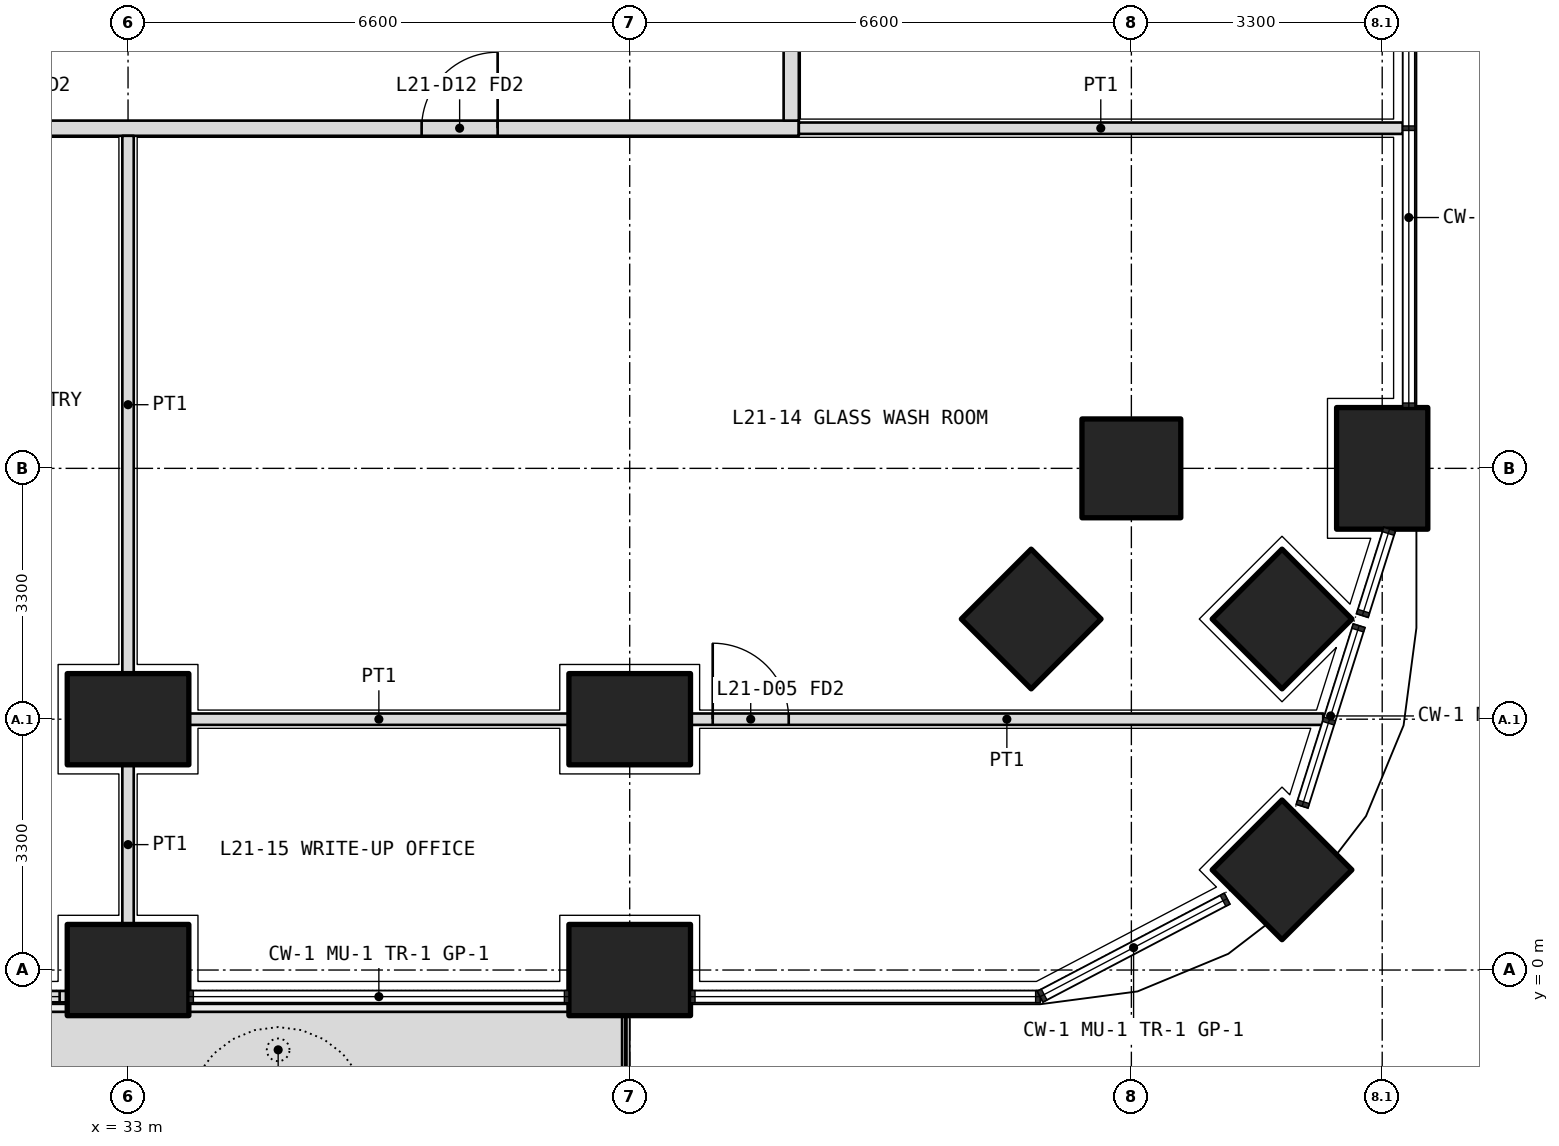
"""IFC4 building model, lengths in metres.
Left out: names, types, materials, properties, quantities, classifications, styles, units other than length and angle.
Written with IfcOpenShell. Run it as: python <this file> out.ifc"""

import sys

from ifc_helpers import new_model, si_unit, direction, frame, frame_2d, origin, origin_2d, place, context, subcontext, project, spatial, polyline, rectangle, outline, extrude, element, fill, save


model = new_model("IFC4")
c1 = context("Model", 3, precision=1e-05, world=origin(), true_north=direction((0.0, 1.0)))
c2 = subcontext(c1, "Body", "Model", "MODEL_VIEW")
j1 = project(units=[si_unit("LENGTHUNIT", "METRE"), si_unit("PLANEANGLEUNIT", "RADIAN")], contexts=[c1])
p1 = place(None, origin())
s1 = spatial("IfcSite", under=j1, at=p1, CompositionType="ELEMENT")
p2 = place(p1, origin())
s2 = spatial("IfcBuilding", under=s1, at=p2, CompositionType="ELEMENT")
p3 = place(p2, frame((0.0, 0.0, 94.8)))
s3 = spatial("IfcBuildingStorey", under=s2, at=p3, CompositionType="ELEMENT", Elevation=94.8)
p4 = place(p3, frame((48.182, 1.318, 0.0), z_axis=(0.0, 0.0, 1.0), x_axis=(0.707106781187, 0.707106781187, 0.0)))
e1 = element("IfcColumn", 1, at=p4, inside=s3, PredefinedType="COLUMN", context=c2, shape_type="SweptSolid", body=[
    extrude(rectangle(XDim=1.3, YDim=1.3, at=origin_2d()), origin(), (0.0, 0.0, 1.0), 4.2),
])
for number, where, z_axis, x_axis in (
    (2, (33.0, 0.0, 0.0), (0.0, 0.0, 1.0), (1.0, 0.0, 0.0)),
    (3, (39.6, 0.0, 0.0), (0.0, 0.0, 1.0), (1.0, 0.0, 0.0)),
    (4, (49.5, 6.6, 0.0), (0.0, 0.0, 1.0), (0.0, 1.0, 0.0)),
):
    element("IfcColumn", number, at=place(p3, frame(where, z_axis=z_axis, x_axis=x_axis)), inside=s3, PredefinedType="COLUMN", context=c2, shape_type="SweptSolid", body=[
        extrude(rectangle(XDim=1.6, YDim=1.2, at=origin_2d()), origin(), (0.0, 0.0, 1.0), 4.2),
    ])
for number, where, z_axis, x_axis in (
    (5, (46.2, 6.6, 0.0), (0.0, 0.0, 1.0), (1.0, 0.0, 0.0)),
    (6, (48.182, 4.618, 0.0), (0.0, 0.0, 1.0), (0.707, 0.707, 0.0)),
):
    element("IfcColumn", number, at=place(p3, frame(where, z_axis=z_axis, x_axis=x_axis)), inside=s3, PredefinedType="COLUMN", context=c2, shape_type="SweptSolid", body=[
        extrude(rectangle(XDim=1.3, YDim=1.3, at=origin_2d()), origin(), (0.0, 0.0, 1.0), 4.2),
    ])
for number, where, z_axis, x_axis in (
    (7, (33.0, 3.3, 0.0), (0.0, 0.0, 1.0), (1.0, 0.0, 0.0)),
    (8, (39.6, 3.3, 0.0), (0.0, 0.0, 1.0), (1.0, 0.0, 0.0)),
):
    element("IfcColumn", number, at=place(p3, frame(where, z_axis=z_axis, x_axis=x_axis)), inside=s3, PredefinedType="COLUMN", context=c2, shape_type="SweptSolid", body=[
        extrude(rectangle(XDim=1.6, YDim=1.2, at=origin_2d()), origin(), (0.0, 0.0, 1.0), 4.2),
    ])
p5 = place(p3, frame((44.882, 4.618, 0.0), z_axis=(0.0, 0.0, 1.0), x_axis=(0.707106781187, 0.707106781187, 0.0)))
e9 = element("IfcColumn", 9, at=p5, inside=s3, PredefinedType="COLUMN", context=c2, shape_type="SweptSolid", body=[
    extrude(rectangle(XDim=1.3, YDim=1.3, at=origin_2d()), origin(), (0.0, 0.0, 1.0), 4.2),
])
p6 = place(p3, origin())
e10 = element("IfcWall", 10, at=p6, inside=s3, PredefinedType="USERDEFINED", context=c2, shape_type="SweptSolid", body=[
    extrude(outline(polyline([(30.45, -1.55), (39.5, -1.55), (39.5, -0.55), (30.45, -0.55), (30.45, -1.55)]), holes=[polyline([(30.6, -1.4), (39.35, -1.4), (39.35, -0.7), (30.6, -0.7), (30.6, -1.4)])]), origin(), (0.0, 0.0, 1.0), 1.05),
])
p7 = place(p3, frame((27.2, -0.35, 0.0), z_axis=(0.0, 0.0, 1.0), x_axis=(1.0, 0.0, 0.0)))
e11 = element("IfcWall", 11, at=p7, inside=s3, PredefinedType="SOLIDWALL", context=c2, shape_type="SweptSolid", body=[
    extrude(rectangle(XDim=5.0, YDim=0.15, at=frame_2d((2.5, 0.0))), origin(), (0.0, 0.0, 1.0), 2.7),
])
p8 = place(p7, frame((2.75, 0.0, 0.0)))
e12 = element("IfcOpeningElement", 12, at=p8, cuts=e11, PredefinedType="OPENING", context=c2, shape_type="SweptSolid", body=[
    extrude(rectangle(XDim=1.0, YDim=2.4, at=frame_2d((0.5, 1.2))), frame((0.0, 0.085, 0.0), z_axis=(0.0, -1.0, 0.0), x_axis=(1.0, 0.0, 0.0)), (0.0, 0.0, 1.0), 0.17),
])
p9 = place(p7, frame((0.1, 0.0, 0.1)))
e13 = element("IfcOpeningElement", 13, at=p9, cuts=e11, PredefinedType="OPENING", context=c2, shape_type="SweptSolid", body=[
    extrude(rectangle(XDim=2.15, YDim=2.3, at=frame_2d((1.075, 1.15))), frame((0.0, 0.085, 0.0), z_axis=(0.0, -1.0, 0.0), x_axis=(1.0, 0.0, 0.0)), (0.0, 0.0, 1.0), 0.17),
])
p10 = place(p7, frame((3.85, 0.0, 0.1)))
e14 = element("IfcOpeningElement", 14, at=p10, cuts=e11, PredefinedType="OPENING", context=c2, shape_type="SweptSolid", body=[
    extrude(rectangle(XDim=1.05, YDim=2.3, at=frame_2d((0.525, 1.15))), frame((0.0, 0.085, 0.0), z_axis=(0.0, -1.0, 0.0), x_axis=(1.0, 0.0, 0.0)), (0.0, 0.0, 1.0), 0.17),
])
p11 = place(p3, frame((10.975, 11.075, 0.0), z_axis=(0.0, 0.0, 1.0), x_axis=(1.0, 0.0, 0.0)))
e15 = element("IfcWall", 15, at=p11, inside=s3, PredefinedType="PARTITIONING", context=c2, shape_type="SweptSolid", body=[
    extrude(rectangle(XDim=30.85, YDim=0.2, at=frame_2d((15.425, 0.0))), origin(), (0.0, 0.0, 1.0), 2.85),
])
p12 = place(p11, frame((0.663, 0.0, 0.0)))
e16 = element("IfcOpeningElement", 16, at=p12, cuts=e15, PredefinedType="OPENING", context=c2, shape_type="SweptSolid", body=[
    extrude(rectangle(XDim=1.0, YDim=2.1, at=frame_2d((0.5, 1.05))), frame((0.0, 0.11, 0.0), z_axis=(0.0, -1.0, 0.0), x_axis=(1.0, 0.0, 0.0)), (0.0, 0.0, 1.0), 0.22),
])
p13 = place(p11, frame((3.275, 0.0, 0.0)))
e17 = element("IfcOpeningElement", 17, at=p13, cuts=e15, PredefinedType="OPENING", context=c2, shape_type="SweptSolid", body=[
    extrude(rectangle(XDim=1.2, YDim=2.1, at=frame_2d((0.6, 1.05))), frame((0.0, 0.11, 0.0), z_axis=(0.0, -1.0, 0.0), x_axis=(1.0, 0.0, 0.0)), (0.0, 0.0, 1.0), 0.22),
])
p14 = place(p11, frame((8.325, 0.0, 0.0)))
e18 = element("IfcOpeningElement", 18, at=p14, cuts=e15, PredefinedType="OPENING", context=c2, shape_type="SweptSolid", body=[
    extrude(rectangle(XDim=1.0, YDim=2.1, at=frame_2d((0.5, 1.05))), frame((0.0, 0.11, 0.0), z_axis=(0.0, -1.0, 0.0), x_axis=(1.0, 0.0, 0.0)), (0.0, 0.0, 1.0), 0.22),
])
p15 = place(p11, frame((13.275, 0.0, 0.0)))
e19 = element("IfcOpeningElement", 19, at=p15, cuts=e15, PredefinedType="OPENING", context=c2, shape_type="SweptSolid", body=[
    extrude(rectangle(XDim=1.0, YDim=2.1, at=frame_2d((0.5, 1.05))), frame((0.0, 0.11, 0.0), z_axis=(0.0, -1.0, 0.0), x_axis=(1.0, 0.0, 0.0)), (0.0, 0.0, 1.0), 0.22),
])
p16 = place(p11, frame((16.625, 0.0, 0.0)))
e20 = element("IfcOpeningElement", 20, at=p16, cuts=e15, PredefinedType="OPENING", context=c2, shape_type="SweptSolid", body=[
    extrude(rectangle(XDim=1.0, YDim=2.1, at=frame_2d((0.5, 1.05))), frame((0.0, 0.11, 0.0), z_axis=(0.0, -1.0, 0.0), x_axis=(1.0, 0.0, 0.0)), (0.0, 0.0, 1.0), 0.22),
])
p17 = place(p11, frame((19.925, 0.0, 0.0)))
e21 = element("IfcOpeningElement", 21, at=p17, cuts=e15, PredefinedType="OPENING", context=c2, shape_type="SweptSolid", body=[
    extrude(rectangle(XDim=1.0, YDim=2.1, at=frame_2d((0.5, 1.05))), frame((0.0, 0.11, 0.0), z_axis=(0.0, -1.0, 0.0), x_axis=(1.0, 0.0, 0.0)), (0.0, 0.0, 1.0), 0.22),
])
p18 = place(p11, frame((25.887, 0.0, 0.0)))
e22 = element("IfcOpeningElement", 22, at=p18, cuts=e15, PredefinedType="OPENING", context=c2, shape_type="SweptSolid", body=[
    extrude(rectangle(XDim=1.0, YDim=2.1, at=frame_2d((0.5, 1.05))), frame((0.0, 0.11, 0.0), z_axis=(0.0, -1.0, 0.0), x_axis=(1.0, 0.0, 0.0)), (0.0, 0.0, 1.0), 0.22),
])
p19 = place(p3, frame((41.725, 11.175, 0.0), z_axis=(0.0, 0.0, 1.0), x_axis=(0.0, 1.0, 0.0)))
e23 = element("IfcWall", 23, at=p19, inside=s3, PredefinedType="PARTITIONING", context=c2, shape_type="SweptSolid", body=[
    extrude(rectangle(XDim=5.325, YDim=0.2, at=frame_2d((2.663, 0.0))), origin(), (0.0, 0.0, 1.0), 2.85),
])
p20 = place(p19, frame((2.113, 0.0, 0.0)))
e24 = element("IfcOpeningElement", 24, at=p20, cuts=e23, PredefinedType="OPENING", context=c2, shape_type="SweptSolid", body=[
    extrude(rectangle(XDim=1.0, YDim=2.1, at=frame_2d((0.5, 1.05))), frame((0.0, 0.11, 0.0), z_axis=(0.0, -1.0, 0.0), x_axis=(1.0, 0.0, 0.0)), (0.0, 0.0, 1.0), 0.22),
])
p21 = place(p3, frame((49.77, 11.075, 0.0), z_axis=(0.0, 0.0, 1.0), x_axis=(-1.0, 0.0, 0.0)))
e25 = element("IfcWall", 25, at=p21, inside=s3, PredefinedType="PARTITIONING", context=c2, shape_type="SweptSolid", body=[
    extrude(rectangle(XDim=7.945, YDim=0.15, at=frame_2d((3.973, 0.0))), origin(), (0.0, 0.0, 1.0), 2.7),
])
p22 = place(p3, frame((33.8, 3.3, 0.0), z_axis=(0.0, 0.0, 1.0), x_axis=(1.0, 0.0, 0.0)))
e26 = element("IfcWall", 26, at=p22, inside=s3, PredefinedType="PARTITIONING", context=c2, shape_type="SweptSolid", body=[
    extrude(rectangle(XDim=5.0, YDim=0.15, at=frame_2d((2.5, 0.0))), origin(), (0.0, 0.0, 1.0), 3.9),
])
p23 = place(p3, frame((40.4, 3.3, 0.0), z_axis=(0.0, 0.0, 1.0), x_axis=(1.0, 0.0, 0.0)))
e27 = element("IfcWall", 27, at=p23, inside=s3, PredefinedType="PARTITIONING", context=c2, shape_type="SweptSolid", body=[
    extrude(rectangle(XDim=8.324, YDim=0.15, at=frame_2d((4.162, 0.0))), origin(), (0.0, 0.0, 1.0), 2.7),
])
p24 = place(p23, frame((0.292, 0.0, 0.0)))
e28 = element("IfcOpeningElement", 28, at=p24, cuts=e27, PredefinedType="OPENING", context=c2, shape_type="SweptSolid", body=[
    extrude(rectangle(XDim=1.0, YDim=2.1, at=frame_2d((0.5, 1.05))), frame((0.0, 0.085, 0.0), z_axis=(0.0, -1.0, 0.0), x_axis=(1.0, 0.0, 0.0)), (0.0, 0.0, 1.0), 0.17),
])
p25 = place(p3, frame((33.0, 0.6, 0.0), z_axis=(0.0, 0.0, 1.0), x_axis=(0.0, 1.0, 0.0)))
e29 = element("IfcWall", 29, at=p25, inside=s3, PredefinedType="PARTITIONING", context=c2, shape_type="SweptSolid", body=[
    extrude(rectangle(XDim=2.1, YDim=0.15, at=frame_2d((1.05, 0.0))), origin(), (0.0, 0.0, 1.0), 2.85),
])
p26 = place(p3, frame((33.0, 3.9, 0.0), z_axis=(0.0, 0.0, 1.0), x_axis=(0.0, 1.0, 0.0)))
e30 = element("IfcWall", 30, at=p26, inside=s3, PredefinedType="PARTITIONING", context=c2, shape_type="SweptSolid", body=[
    extrude(rectangle(XDim=7.075, YDim=0.15, at=frame_2d((3.538, 0.0))), origin(), (0.0, 0.0, 1.0), 2.85),
])
p27 = place(p10, origin())
e31 = element("IfcWindow", 31, at=p27, inside=s3, PartitioningType="SINGLE_PANEL", PredefinedType="WINDOW", context=c2, shape_type="SweptSolid", body=[
    extrude(rectangle(XDim=1.05, YDim=2.3, at=frame_2d((0.525, 1.15))), frame((0.0, 0.03, 0.0), z_axis=(0.0, -1.0, 0.0), x_axis=(1.0, 0.0, 0.0)), (0.0, 0.0, 1.0), 0.06),
])
fill(e14, e31)
p28 = place(p18, origin())
e32 = element("IfcDoor", 32, at=p28, inside=s3, OperationType="SINGLE_SWING_RIGHT", PredefinedType="DOOR", context=c2, shape_type="SweptSolid", body=[
    extrude(rectangle(XDim=1.0, YDim=2.1, at=frame_2d((0.5, 1.05))), frame((0.0, 0.025, 0.0), z_axis=(0.0, -1.0, 0.0), x_axis=(1.0, 0.0, 0.0)), (0.0, 0.0, 1.0), 0.05),
])
fill(e22, e32)
p29 = place(p24, origin())
e33 = element("IfcDoor", 33, at=p29, inside=s3, OperationType="SINGLE_SWING_LEFT", PredefinedType="DOOR", context=c2, shape_type="SweptSolid", body=[
    extrude(rectangle(XDim=1.0, YDim=2.1, at=frame_2d((0.5, 1.05))), frame((0.0, 0.025, 0.0), z_axis=(0.0, -1.0, 0.0), x_axis=(1.0, 0.0, 0.0)), (0.0, 0.0, 1.0), 0.05),
])
fill(e28, e33)
save(model, sys.argv[1])
